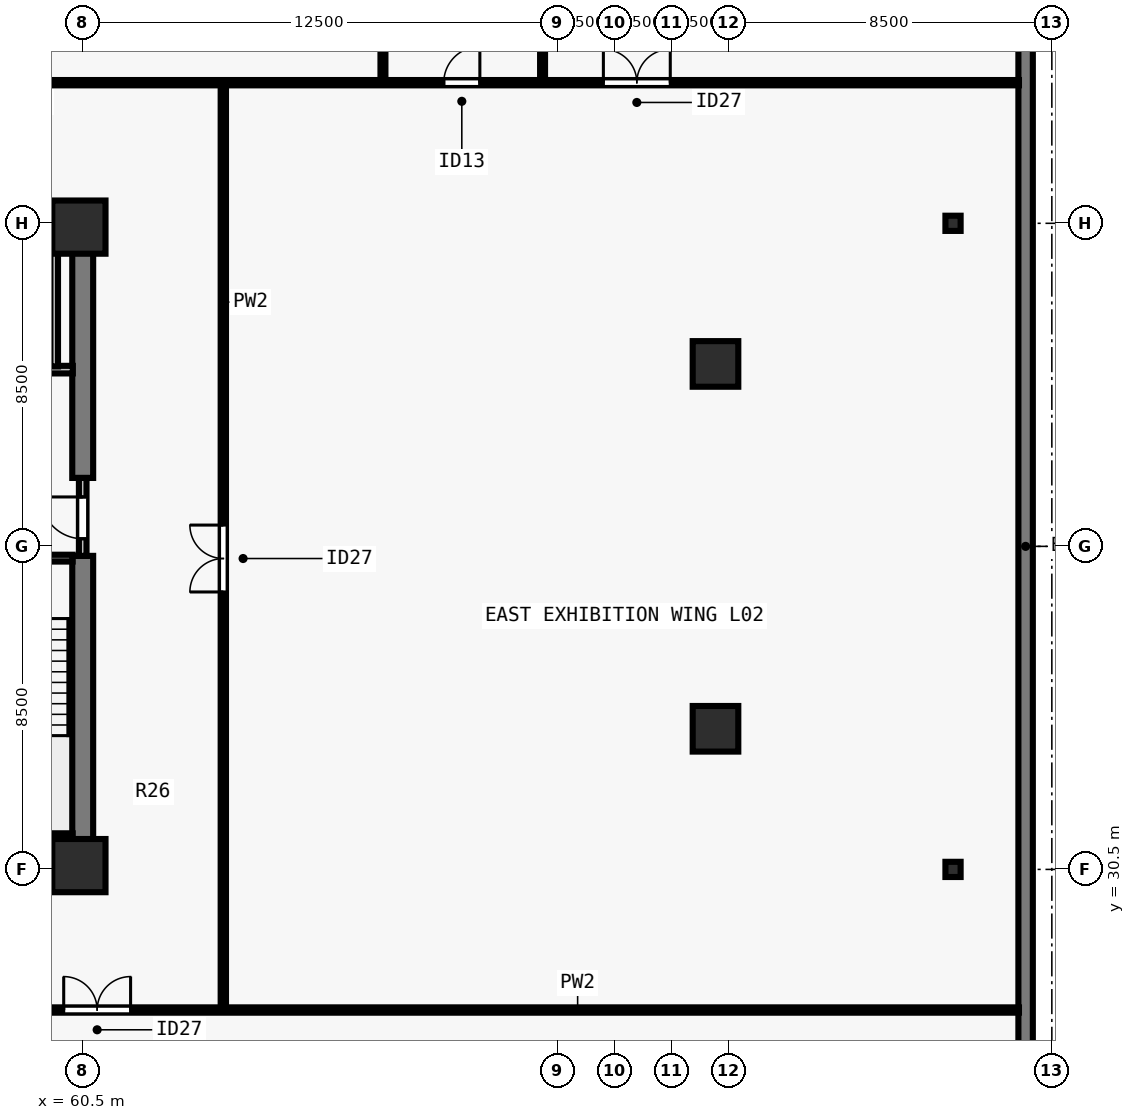
"""IFC4 building model, lengths in metres.
Left out: names, types, materials, properties, quantities, classifications, styles, units other than length and angle.
Written with IfcOpenShell. Run it as: python <this file> out.ifc"""

import sys

from ifc_helpers import new_model, si_unit, direction, frame, frame_2d, origin, origin_2d, place, context, subcontext, project, spatial, rectangle, i_section, extrude, element, fill, save


model = new_model("IFC4")
c1 = context("Model", 3, precision=1e-05, world=origin(), true_north=direction((0.0, 1.0)))
c2 = subcontext(c1, "Body", "Model", "MODEL_VIEW")
j1 = project(units=[si_unit("LENGTHUNIT", "METRE"), si_unit("PLANEANGLEUNIT", "RADIAN")], contexts=[c1])
p1 = place(None, origin())
s1 = spatial("IfcSite", under=j1, at=p1, CompositionType="ELEMENT")
p2 = place(p1, origin())
s2 = spatial("IfcBuilding", under=s1, at=p2, CompositionType="ELEMENT")
p3 = place(p2, frame((0.0, 0.0, 10.0)))
s3 = spatial("IfcBuildingStorey", under=s2, at=p3, CompositionType="ELEMENT", Elevation=10.0)
for number, where, z_axis, x_axis in (
    (1, (60.4, 30.6, 0.0), (0.0, 0.0, 1.0), (1.0, 0.0, 0.0)),
    (2, (60.4, 47.4, 0.0), (0.0, 0.0, 1.0), (1.0, 0.0, 0.0)),
):
    element("IfcColumn", number, at=place(p3, frame(where, z_axis=z_axis, x_axis=x_axis)), inside=s3, PredefinedType="COLUMN", context=c2, shape_type="SweptSolid", body=[
        extrude(rectangle(XDim=1.4, YDim=1.4, at=origin_2d()), origin(), (0.0, 0.0, 1.0), 4.5),
    ])
for number, where, z_axis, x_axis in (
    (3, (77.15, 34.2, 0.0), (0.0, 0.0, 1.0), (1.0, 0.0, 0.0)),
    (4, (77.15, 43.8, 0.0), (0.0, 0.0, 1.0), (1.0, 0.0, 0.0)),
):
    element("IfcColumn", number, at=place(p3, frame(where, z_axis=z_axis, x_axis=x_axis)), inside=s3, PredefinedType="COLUMN", context=c2, shape_type="SweptSolid", body=[
        extrude(rectangle(XDim=1.2, YDim=1.2, at=origin_2d()), origin(), (0.0, 0.0, 1.0), 4.5),
    ])
for number, where, z_axis, x_axis in (
    (5, (83.4, 30.5, 0.0), (0.0, 0.0, 1.0), (1.0, 0.0, 0.0)),
    (6, (83.4, 47.5, 0.0), (0.0, 0.0, 1.0), (1.0, 0.0, 0.0)),
):
    element("IfcColumn", number, at=place(p3, frame(where, z_axis=z_axis, x_axis=x_axis)), inside=s3, PredefinedType="COLUMN", context=c2, shape_type="SweptSolid", body=[
        extrude(i_section(OverallWidth=0.4, OverallDepth=0.4, WebThickness=0.028, FlangeThickness=0.045, at=origin_2d()), origin(), (0.0, 0.0, 1.0), 4.5),
    ])
p4 = place(p3, frame((85.31, 65.635, 0.0), z_axis=(0.0, 0.0, 1.0), x_axis=(0.0, -1.0, 0.0)))
e7 = element("IfcWall", 7, at=p4, inside=s3, PredefinedType="SOLIDWALL", context=c2, shape_type="SweptSolid", body=[
    extrude(rectangle(XDim=53.27, YDim=0.38, at=frame_2d((26.635, 0.0))), origin(), (0.0, 0.0, 1.0), 4.22),
])
for number, where, z_axis, x_axis in (
    (8, (43.225, 30.5, 0.0), (0.0, 0.0, 1.0), (1.0, 0.0, 0.0)),
    (9, (43.225, 47.5, 0.0), (0.0, 0.0, 1.0), (1.0, 0.0, 0.0)),
):
    element("IfcWall", number, at=place(p3, frame(where, z_axis=z_axis, x_axis=x_axis)), inside=s3, PredefinedType="SHEAR", context=c2, shape_type="SweptSolid", body=[
        extrude(rectangle(XDim=17.55, YDim=0.55, at=frame_2d((8.775, 0.0))), origin(), (0.0, 0.0, 1.0), 4.22),
    ])
p5 = place(p3, frame((60.5, 30.765, 0.0), z_axis=(0.0, 0.0, 1.0), x_axis=(0.0, 1.0, 0.0)))
e10 = element("IfcWall", 10, at=p5, inside=s3, PredefinedType="SHEAR", context=c2, shape_type="SweptSolid", body=[
    extrude(rectangle(XDim=7.985, YDim=0.55, at=frame_2d((3.993, 0.0))), origin(), (0.0, 0.0, 1.0), 4.22),
])
p6 = place(p3, frame((60.5, 40.8, 0.0), z_axis=(0.0, 0.0, 1.0), x_axis=(0.0, 1.0, 0.0)))
e11 = element("IfcWall", 11, at=p6, inside=s3, PredefinedType="SHEAR", context=c2, shape_type="SweptSolid", body=[
    extrude(rectangle(XDim=6.435, YDim=0.55, at=frame_2d((3.218, 0.0))), origin(), (0.0, 0.0, 1.0), 4.22),
])
p7 = place(p3, frame((60.5, 38.75, 0.0), z_axis=(0.0, 0.0, 1.0), x_axis=(0.0, 1.0, 0.0)))
e12 = element("IfcWall", 12, at=p7, inside=s3, PredefinedType="SOLIDWALL", context=c2, shape_type="SweptSolid", body=[
    extrude(rectangle(XDim=2.05, YDim=0.2, at=frame_2d((1.025, 0.0))), origin(), (0.0, 0.0, 1.0), 4.22),
])
p8 = place(p7, frame((0.45, 0.0, 0.0)))
e13 = element("IfcOpeningElement", 13, at=p8, cuts=e12, PredefinedType="OPENING", context=c2, shape_type="SweptSolid", body=[
    extrude(rectangle(XDim=1.1, YDim=2.15, at=frame_2d((0.55, 1.075))), frame((0.0, 0.11, 0.0), z_axis=(0.0, -1.0, 0.0), x_axis=(1.0, 0.0, 0.0)), (0.0, 0.0, 1.0), 0.22),
])
p9 = place(p3, frame((56.735, 43.65, 0.0), z_axis=(0.0, 0.0, 1.0), x_axis=(1.0, 0.0, 0.0)))
e14 = element("IfcWall", 14, at=p9, inside=s3, PredefinedType="SOLIDWALL", context=c2, shape_type="SweptSolid", body=[
    extrude(rectangle(XDim=3.505, YDim=0.2, at=frame_2d((1.752, 0.0))), origin(), (0.0, 0.0, 1.0), 4.22),
])
p10 = place(p9, frame((1.295, 0.0, 0.0)))
e15 = element("IfcOpeningElement", 15, at=p10, cuts=e14, PredefinedType="OPENING", context=c2, shape_type="SweptSolid", body=[
    extrude(rectangle(XDim=1.1, YDim=2.2, at=frame_2d((0.55, 1.1))), frame((0.0, 0.11, 0.0), z_axis=(0.0, -1.0, 0.0), x_axis=(1.0, 0.0, 0.0)), (0.0, 0.0, 1.0), 0.22),
])
p11 = place(p3, frame((59.75, 43.735, 0.0), z_axis=(0.0, 0.0, 1.0), x_axis=(0.0, 1.0, 0.0)))
e16 = element("IfcWall", 16, at=p11, inside=s3, PredefinedType="SOLIDWALL", context=c2, shape_type="SweptSolid", body=[
    extrude(rectangle(XDim=3.505, YDim=0.2, at=frame_2d((1.752, 0.0))), origin(), (0.0, 0.0, 1.0), 4.22),
])
p12 = place(p3, frame((18.865, 26.8, 0.0), z_axis=(0.0, 0.0, 1.0), x_axis=(1.0, 0.0, 0.0)))
e17 = element("IfcWall", 17, at=p12, inside=s3, PredefinedType="PARTITIONING", context=c2, shape_type="SweptSolid", body=[
    extrude(rectangle(XDim=66.27, YDim=0.14, at=frame_2d((33.135, 0.0))), origin(), (0.0, 0.0, 1.0), 3.738),
])
p13 = place(p12, frame((18.915, 0.0, 0.0)))
e18 = element("IfcOpeningElement", 18, at=p13, cuts=e17, PredefinedType="OPENING", context=c2, shape_type="SweptSolid", body=[
    extrude(rectangle(XDim=1.76, YDim=2.2, at=frame_2d((0.88, 1.1))), frame((0.0, 0.08, 0.0), z_axis=(0.0, -1.0, 0.0), x_axis=(1.0, 0.0, 0.0)), (0.0, 0.0, 1.0), 0.16),
])
p14 = place(p12, frame((41.135, 0.0, 0.0)))
e19 = element("IfcOpeningElement", 19, at=p14, cuts=e17, PredefinedType="OPENING", context=c2, shape_type="SweptSolid", body=[
    extrude(rectangle(XDim=1.76, YDim=2.2, at=frame_2d((0.88, 1.1))), frame((0.0, 0.08, 0.0), z_axis=(0.0, -1.0, 0.0), x_axis=(1.0, 0.0, 0.0)), (0.0, 0.0, 1.0), 0.16),
])
p15 = place(p3, frame((18.865, 51.2, 0.0), z_axis=(0.0, 0.0, 1.0), x_axis=(1.0, 0.0, 0.0)))
e20 = element("IfcWall", 20, at=p15, inside=s3, PredefinedType="PARTITIONING", context=c2, shape_type="SweptSolid", body=[
    extrude(rectangle(XDim=66.27, YDim=0.14, at=frame_2d((33.135, 0.0))), origin(), (0.0, 0.0, 1.0), 3.738),
])
p16 = place(p15, frame((24.335, 0.0, 0.0)))
e21 = element("IfcOpeningElement", 21, at=p16, cuts=e20, PredefinedType="OPENING", context=c2, shape_type="SweptSolid", body=[
    extrude(rectangle(XDim=1.76, YDim=2.2, at=frame_2d((0.88, 1.1))), frame((0.0, 0.08, 0.0), z_axis=(0.0, -1.0, 0.0), x_axis=(1.0, 0.0, 0.0)), (0.0, 0.0, 1.0), 0.16),
])
p17 = place(p15, frame((37.135, 0.0, 0.0)))
e22 = element("IfcOpeningElement", 22, at=p17, cuts=e20, PredefinedType="OPENING", context=c2, shape_type="SweptSolid", body=[
    extrude(rectangle(XDim=1.76, YDim=2.2, at=frame_2d((0.88, 1.1))), frame((0.0, 0.08, 0.0), z_axis=(0.0, -1.0, 0.0), x_axis=(1.0, 0.0, 0.0)), (0.0, 0.0, 1.0), 0.16),
])
p18 = place(p15, frame((51.135, 0.0, 0.0)))
e23 = element("IfcOpeningElement", 23, at=p18, cuts=e20, PredefinedType="OPENING", context=c2, shape_type="SweptSolid", body=[
    extrude(rectangle(XDim=0.95, YDim=2.1, at=frame_2d((0.475, 1.05))), frame((0.0, 0.08, 0.0), z_axis=(0.0, -1.0, 0.0), x_axis=(1.0, 0.0, 0.0)), (0.0, 0.0, 1.0), 0.16),
])
p19 = place(p15, frame((55.335, 0.0, 0.0)))
e24 = element("IfcOpeningElement", 24, at=p19, cuts=e20, PredefinedType="OPENING", context=c2, shape_type="SweptSolid", body=[
    extrude(rectangle(XDim=1.76, YDim=2.2, at=frame_2d((0.88, 1.1))), frame((0.0, 0.08, 0.0), z_axis=(0.0, -1.0, 0.0), x_axis=(1.0, 0.0, 0.0)), (0.0, 0.0, 1.0), 0.16),
])
p20 = place(p3, frame((64.2, 26.855, 0.0), z_axis=(0.0, 0.0, 1.0), x_axis=(0.0, 1.0, 0.0)))
e25 = element("IfcWall", 25, at=p20, inside=s3, PredefinedType="PARTITIONING", context=c2, shape_type="SweptSolid", body=[
    extrude(rectangle(XDim=24.29, YDim=0.14, at=frame_2d((12.145, 0.0))), origin(), (0.0, 0.0, 1.0), 4.22),
])
p21 = place(p20, frame((10.945, 0.0, 0.0)))
e26 = element("IfcOpeningElement", 26, at=p21, cuts=e25, PredefinedType="OPENING", context=c2, shape_type="SweptSolid", body=[
    extrude(rectangle(XDim=1.76, YDim=2.2, at=frame_2d((0.88, 1.1))), frame((0.0, 0.08, 0.0), z_axis=(0.0, -1.0, 0.0), x_axis=(1.0, 0.0, 0.0)), (0.0, 0.0, 1.0), 0.16),
])
p22 = place(p3, frame((68.4, 51.3, 0.0), z_axis=(0.0, 0.0, 1.0), x_axis=(0.0, 1.0, 0.0)))
e27 = element("IfcWall", 27, at=p22, inside=s3, PredefinedType="PLUMBINGWALL", context=c2, shape_type="SweptSolid", body=[
    extrude(rectangle(XDim=14.335, YDim=0.13, at=frame_2d((7.167, 0.0))), origin(), (0.0, 0.0, 1.0), 3.271),
])
p23 = place(p3, frame((72.6, 51.3, 0.0), z_axis=(0.0, 0.0, 1.0), x_axis=(0.0, 1.0, 0.0)))
e28 = element("IfcWall", 28, at=p23, inside=s3, PredefinedType="PLUMBINGWALL", context=c2, shape_type="SweptSolid", body=[
    extrude(rectangle(XDim=5.1, YDim=0.13, at=frame_2d((2.55, 0.0))), origin(), (0.0, 0.0, 1.0), 4.22),
])
p24 = place(p3, frame((57.005, 38.69, 0.0), z_axis=(0.0, 0.0, 1.0), x_axis=(1.0, 0.0, 0.0)))
e29 = element("IfcWall", 29, at=p24, inside=s3, PredefinedType="SOLIDWALL", context=c2, shape_type="SweptSolid", body=[
    extrude(rectangle(XDim=3.23, YDim=0.18, at=frame_2d((1.615, 0.0))), origin(), (0.0, 0.0, 1.0), 4.22),
])
p25 = place(p24, frame((1.14, 0.0, 0.0)))
e30 = element("IfcOpeningElement", 30, at=p25, cuts=e29, PredefinedType="OPENING", context=c2, shape_type="SweptSolid", body=[
    extrude(rectangle(XDim=0.95, YDim=2.15, at=frame_2d((0.475, 1.075))), frame((0.0, 0.1, 0.0), z_axis=(0.0, -1.0, 0.0), x_axis=(1.0, 0.0, 0.0)), (0.0, 0.0, 1.0), 0.2),
])
p26 = place(p3, frame((57.005, 31.36, 0.0), z_axis=(0.0, 0.0, 1.0), x_axis=(1.0, 0.0, 0.0)))
e31 = element("IfcWall", 31, at=p26, inside=s3, PredefinedType="SOLIDWALL", context=c2, shape_type="SweptSolid", body=[
    extrude(rectangle(XDim=3.23, YDim=0.18, at=frame_2d((1.615, 0.0))), origin(), (0.0, 0.0, 1.0), 4.22),
])
p27 = place(p8, origin())
e32 = element("IfcDoor", 32, at=p27, inside=s3, OperationType="SINGLE_SWING_RIGHT", PredefinedType="DOOR", context=c2, shape_type="SweptSolid", body=[
    extrude(rectangle(XDim=1.1, YDim=2.15, at=frame_2d((0.55, 1.075))), frame((0.0, 0.025, 0.0), z_axis=(0.0, -1.0, 0.0), x_axis=(1.0, 0.0, 0.0)), (0.0, 0.0, 1.0), 0.05),
])
fill(e13, e32)
p28 = place(p14, origin())
e33 = element("IfcDoor", 33, at=p28, inside=s3, OperationType="DOUBLE_DOOR_SINGLE_SWING", PredefinedType="DOOR", context=c2, shape_type="SweptSolid", body=[
    extrude(rectangle(XDim=1.76, YDim=2.2, at=frame_2d((0.88, 1.1))), frame((0.0, 0.025, 0.0), z_axis=(0.0, -1.0, 0.0), x_axis=(1.0, 0.0, 0.0)), (0.0, 0.0, 1.0), 0.05),
])
fill(e19, e33)
p29 = place(p18, origin())
e34 = element("IfcDoor", 34, at=p29, inside=s3, OperationType="SINGLE_SWING_RIGHT", PredefinedType="DOOR", context=c2, shape_type="SweptSolid", body=[
    extrude(rectangle(XDim=0.95, YDim=2.1, at=frame_2d((0.475, 1.05))), frame((0.0, 0.025, 0.0), z_axis=(0.0, -1.0, 0.0), x_axis=(1.0, 0.0, 0.0)), (0.0, 0.0, 1.0), 0.05),
])
fill(e23, e34)
p30 = place(p19, origin())
e35 = element("IfcDoor", 35, at=p30, inside=s3, OperationType="DOUBLE_DOOR_SINGLE_SWING", PredefinedType="DOOR", context=c2, shape_type="SweptSolid", body=[
    extrude(rectangle(XDim=1.76, YDim=2.2, at=frame_2d((0.88, 1.1))), frame((0.0, 0.025, 0.0), z_axis=(0.0, -1.0, 0.0), x_axis=(1.0, 0.0, 0.0)), (0.0, 0.0, 1.0), 0.05),
])
fill(e24, e35)
p31 = place(p21, origin())
e36 = element("IfcDoor", 36, at=p31, inside=s3, OperationType="DOUBLE_DOOR_SINGLE_SWING", PredefinedType="DOOR", context=c2, shape_type="SweptSolid", body=[
    extrude(rectangle(XDim=1.76, YDim=2.2, at=frame_2d((0.88, 1.1))), frame((0.0, 0.025, 0.0), z_axis=(0.0, -1.0, 0.0), x_axis=(1.0, 0.0, 0.0)), (0.0, 0.0, 1.0), 0.05),
])
fill(e26, e36)
save(model, sys.argv[1])
